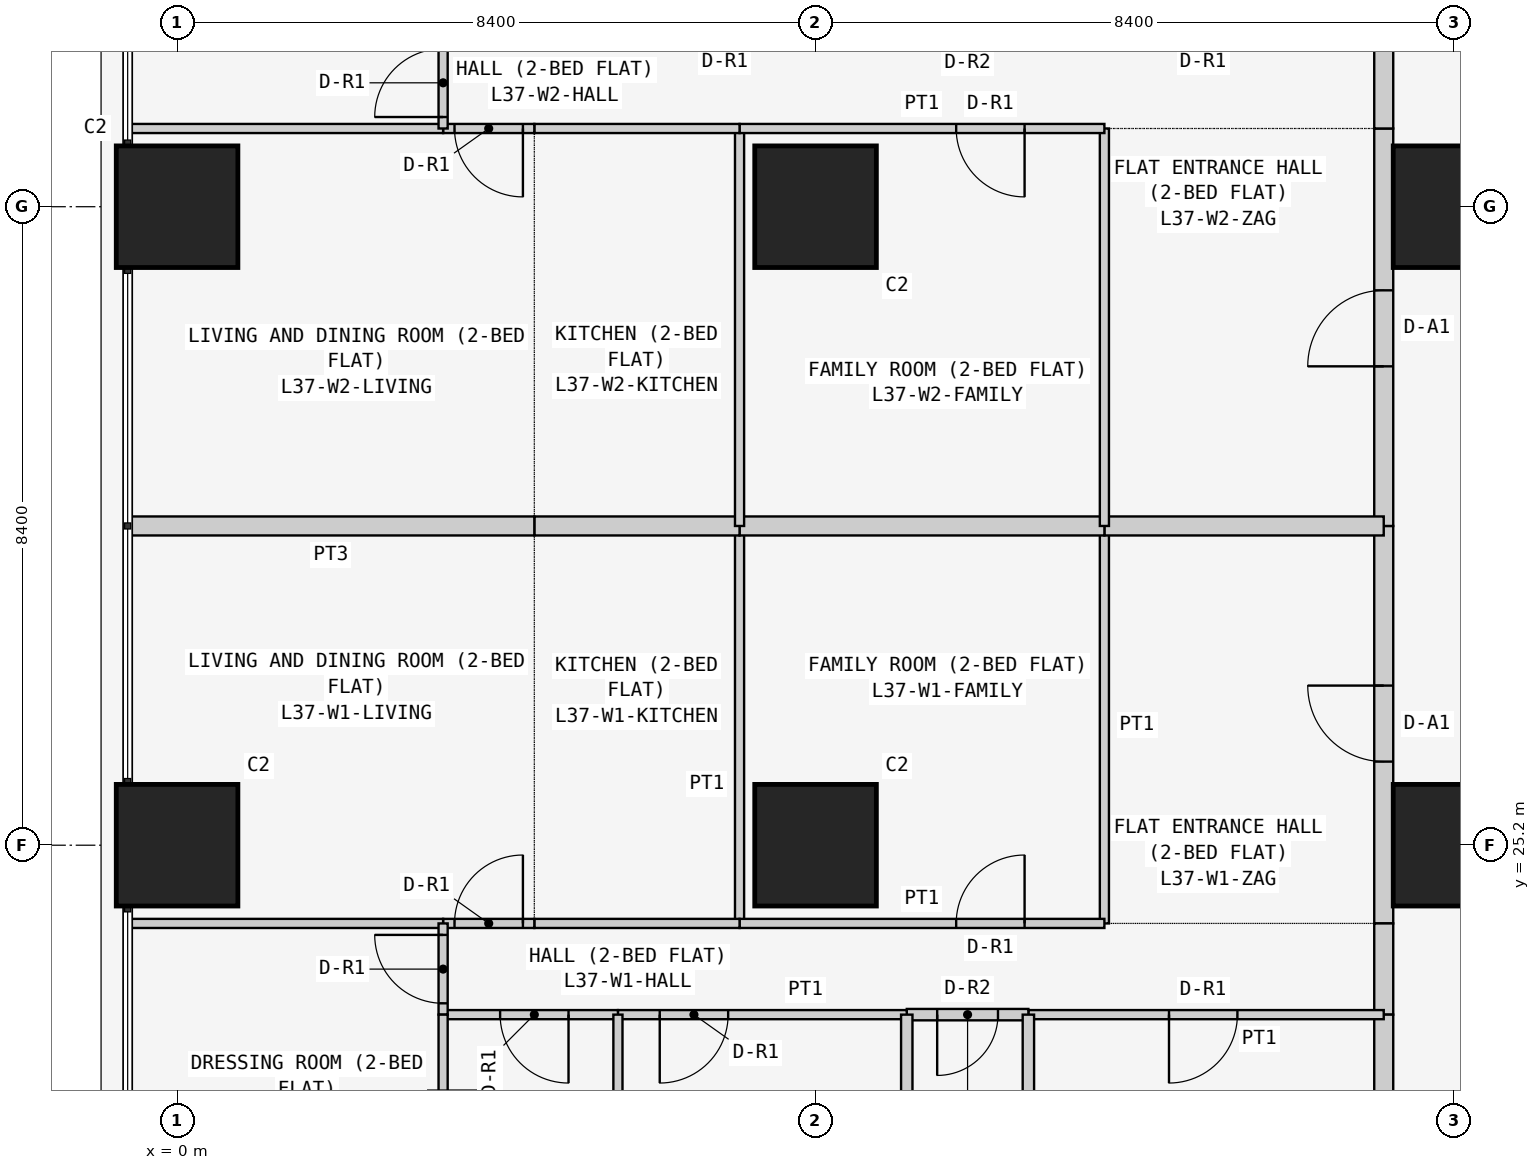
"""IFC4 building model, lengths in metres.
Left out: names, types, materials, properties, quantities, classifications, styles, units other than length and angle.
Written with IfcOpenShell. Run it as: python <this file> out.ifc"""

import sys

from ifc_helpers import new_model, si_unit, direction, frame, frame_2d, origin, origin_2d, place, context, subcontext, project, spatial, rectangle, extrude, element, fill, save


model = new_model("IFC4")
c1 = context("Model", 3, precision=1e-05, world=origin(), true_north=direction((0.0, 1.0)))
c2 = subcontext(c1, "Body", "Model", "MODEL_VIEW")
j1 = project(units=[si_unit("LENGTHUNIT", "METRE"), si_unit("PLANEANGLEUNIT", "RADIAN")], contexts=[c1])
p1 = place(None, origin())
s1 = spatial("IfcSite", under=j1, at=p1, CompositionType="ELEMENT")
p2 = place(p1, origin())
s2 = spatial("IfcBuilding", under=s1, at=p2, CompositionType="ELEMENT")
p3 = place(p2, frame((0.0, 0.0, 144.9)))
s3 = spatial("IfcBuildingStorey", under=s2, at=p3, CompositionType="ELEMENT", Elevation=144.9)
for number, where, z_axis, x_axis in (
    (1, (0.0, 25.2, 0.0), (0.0, 0.0, 1.0), (1.0, 0.0, 0.0)),
    (2, (0.0, 33.6, 0.0), (0.0, 0.0, 1.0), (1.0, 0.0, 0.0)),
    (3, (8.4, 25.2, 0.0), (0.0, 0.0, 1.0), (1.0, 0.0, 0.0)),
    (4, (8.4, 33.6, 0.0), (0.0, 0.0, 1.0), (1.0, 0.0, 0.0)),
    (5, (16.8, 25.2, 0.0), (0.0, 0.0, 1.0), (1.0, 0.0, 0.0)),
    (6, (16.8, 33.6, 0.0), (0.0, 0.0, 1.0), (1.0, 0.0, 0.0)),
):
    element("IfcColumn", number, at=place(p3, frame(where, z_axis=z_axis, x_axis=x_axis)), inside=s3, PredefinedType="COLUMN", context=c2, shape_type="SweptSolid", body=[
        extrude(rectangle(XDim=1.6, YDim=1.6, at=origin_2d()), origin(), (0.0, 0.0, 1.0), 3.6),
    ])
p4 = place(p3, frame((15.875, 24.171, 0.0), z_axis=(0.0, 0.0, 1.0), x_axis=(0.0, 1.0, 0.0)))
e7 = element("IfcWall", 7, at=p4, inside=s3, PredefinedType="PARTITIONING", context=c2, shape_type="SweptSolid", body=[
    extrude(rectangle(XDim=5.229, YDim=0.25, at=frame_2d((2.615, 0.0))), origin(), (0.0, 0.0, 1.0), 3.45),
])
p5 = place(p4, frame((2.129, 0.0, 0.0)))
e8 = element("IfcOpeningElement", 8, at=p5, cuts=e7, PredefinedType="OPENING", context=c2, shape_type="SweptSolid", body=[
    extrude(rectangle(XDim=1.0, YDim=2.1, at=frame_2d((0.5, 1.05))), frame((0.0, 0.135, 0.0), z_axis=(0.0, -1.0, 0.0), x_axis=(1.0, 0.0, 0.0)), (0.0, 0.0, 1.0), 0.27),
])
p6 = place(p3, frame((15.875, 22.971, 0.0), z_axis=(0.0, 0.0, 1.0), x_axis=(0.0, 1.0, 0.0)))
e9 = element("IfcWall", 9, at=p6, inside=s3, PredefinedType="PARTITIONING", context=c2, shape_type="SweptSolid", body=[
    extrude(rectangle(XDim=1.2, YDim=0.25, at=frame_2d((0.6, 0.0))), origin(), (0.0, 0.0, 1.0), 3.45),
])
p7 = place(p3, frame((15.875, 16.1, 0.0), z_axis=(0.0, 0.0, 1.0), x_axis=(0.0, 1.0, 0.0)))
e10 = element("IfcWall", 10, at=p7, inside=s3, PredefinedType="PARTITIONING", context=c2, shape_type="SweptSolid", body=[
    extrude(rectangle(XDim=6.871, YDim=0.25, at=frame_2d((3.436, 0.0))), origin(), (0.0, 0.0, 1.0), 3.45),
])
p8 = place(p3, frame((15.875, 29.4, 0.0), z_axis=(0.0, 0.0, 1.0), x_axis=(0.0, 1.0, 0.0)))
e11 = element("IfcWall", 11, at=p8, inside=s3, PredefinedType="PARTITIONING", context=c2, shape_type="SweptSolid", body=[
    extrude(rectangle(XDim=5.229, YDim=0.25, at=frame_2d((2.615, 0.0))), origin(), (0.0, 0.0, 1.0), 3.45),
])
p9 = place(p8, frame((2.1, 0.0, 0.0)))
e12 = element("IfcOpeningElement", 12, at=p9, cuts=e11, PredefinedType="OPENING", context=c2, shape_type="SweptSolid", body=[
    extrude(rectangle(XDim=1.0, YDim=2.1, at=frame_2d((0.5, 1.05))), frame((0.0, 0.135, 0.0), z_axis=(0.0, -1.0, 0.0), x_axis=(1.0, 0.0, 0.0)), (0.0, 0.0, 1.0), 0.27),
])
p10 = place(p3, frame((15.875, 34.629, 0.0), z_axis=(0.0, 0.0, 1.0), x_axis=(0.0, 1.0, 0.0)))
e13 = element("IfcWall", 13, at=p10, inside=s3, PredefinedType="PARTITIONING", context=c2, shape_type="SweptSolid", body=[
    extrude(rectangle(XDim=1.2, YDim=0.25, at=frame_2d((0.6, 0.0))), origin(), (0.0, 0.0, 1.0), 3.45),
])
p11 = place(p3, frame((12.2, 29.4, 0.0), z_axis=(0.0, 0.0, 1.0), x_axis=(0.0, -1.0, 0.0)))
e14 = element("IfcWall", 14, at=p11, inside=s3, PredefinedType="PARTITIONING", context=c2, shape_type="SweptSolid", body=[
    extrude(rectangle(XDim=5.229, YDim=0.12, at=frame_2d((2.615, 0.0))), origin(), (0.0, 0.0, 1.0), 3.45),
])
p12 = place(p3, frame((15.875, 29.4, 0.0), z_axis=(0.0, 0.0, 1.0), x_axis=(-1.0, 0.0, 0.0)))
e15 = element("IfcWall", 15, at=p12, inside=s3, PredefinedType="PARTITIONING", context=c2, shape_type="SweptSolid", body=[
    extrude(rectangle(XDim=3.675, YDim=0.25, at=frame_2d((1.837, 0.0))), origin(), (0.0, 0.0, 1.0), 3.45),
])
p13 = place(p3, frame((7.4, 29.4, 0.0), z_axis=(0.0, 0.0, 1.0), x_axis=(0.0, -1.0, 0.0)))
e16 = element("IfcWall", 16, at=p13, inside=s3, PredefinedType="PARTITIONING", context=c2, shape_type="SweptSolid", body=[
    extrude(rectangle(XDim=5.229, YDim=0.12, at=frame_2d((2.615, 0.0))), origin(), (0.0, 0.0, 1.0), 3.45),
])
p14 = place(p3, frame((7.4, 24.171, 0.0), z_axis=(0.0, 0.0, 1.0), x_axis=(1.0, 0.0, 0.0)))
e17 = element("IfcWall", 17, at=p14, inside=s3, PredefinedType="PARTITIONING", context=c2, shape_type="SweptSolid", body=[
    extrude(rectangle(XDim=4.8, YDim=0.12, at=frame_2d((2.4, 0.0))), origin(), (0.0, 0.0, 1.0), 3.45),
])
p15 = place(p14, frame((2.85, 0.0, 0.0)))
e18 = element("IfcOpeningElement", 18, at=p15, cuts=e17, PredefinedType="OPENING", context=c2, shape_type="SweptSolid", body=[
    extrude(rectangle(XDim=0.9, YDim=2.1, at=frame_2d((0.45, 1.05))), frame((0.0, 0.07, 0.0), z_axis=(0.0, -1.0, 0.0), x_axis=(1.0, 0.0, 0.0)), (0.0, 0.0, 1.0), 0.14),
])
p16 = place(p3, frame((12.2, 29.4, 0.0), z_axis=(0.0, 0.0, 1.0), x_axis=(-1.0, 0.0, 0.0)))
e19 = element("IfcWall", 19, at=p16, inside=s3, PredefinedType="PARTITIONING", context=c2, shape_type="SweptSolid", body=[
    extrude(rectangle(XDim=4.8, YDim=0.25, at=frame_2d((2.4, 0.0))), origin(), (0.0, 0.0, 1.0), 3.45),
])
p17 = place(p3, frame((4.7, 24.171, 0.0), z_axis=(0.0, 0.0, 1.0), x_axis=(1.0, 0.0, 0.0)))
e20 = element("IfcWall", 20, at=p17, inside=s3, PredefinedType="PARTITIONING", context=c2, shape_type="SweptSolid", body=[
    extrude(rectangle(XDim=2.7, YDim=0.12, at=frame_2d((1.35, 0.0))), origin(), (0.0, 0.0, 1.0), 3.45),
])
p18 = place(p3, frame((7.4, 29.4, 0.0), z_axis=(0.0, 0.0, 1.0), x_axis=(-1.0, 0.0, 0.0)))
e21 = element("IfcWall", 21, at=p18, inside=s3, PredefinedType="PARTITIONING", context=c2, shape_type="SweptSolid", body=[
    extrude(rectangle(XDim=2.7, YDim=0.25, at=frame_2d((1.35, 0.0))), origin(), (0.0, 0.0, 1.0), 3.45),
])
p19 = place(p3, frame((3.5, 24.171, 0.0), z_axis=(0.0, 0.0, 1.0), x_axis=(1.0, 0.0, 0.0)))
e22 = element("IfcWall", 22, at=p19, inside=s3, PredefinedType="PARTITIONING", context=c2, shape_type="SweptSolid", body=[
    extrude(rectangle(XDim=1.2, YDim=0.12, at=frame_2d((0.6, 0.0))), origin(), (0.0, 0.0, 1.0), 3.45),
])
p20 = place(p19, frame((0.15, 0.0, 0.0)))
e23 = element("IfcOpeningElement", 23, at=p20, cuts=e22, PredefinedType="OPENING", context=c2, shape_type="SweptSolid", body=[
    extrude(rectangle(XDim=0.9, YDim=2.1, at=frame_2d((0.45, 1.05))), frame((0.0, 0.07, 0.0), z_axis=(0.0, -1.0, 0.0), x_axis=(1.0, 0.0, 0.0)), (0.0, 0.0, 1.0), 0.14),
])
p21 = place(p3, frame((-0.65, 24.171, 0.0), z_axis=(0.0, 0.0, 1.0), x_axis=(1.0, 0.0, 0.0)))
e24 = element("IfcWall", 24, at=p21, inside=s3, PredefinedType="PARTITIONING", context=c2, shape_type="SweptSolid", body=[
    extrude(rectangle(XDim=4.15, YDim=0.12, at=frame_2d((2.075, 0.0))), origin(), (0.0, 0.0, 1.0), 3.45),
])
p22 = place(p3, frame((4.7, 29.4, 0.0), z_axis=(0.0, 0.0, 1.0), x_axis=(-1.0, 0.0, 0.0)))
e25 = element("IfcWall", 25, at=p22, inside=s3, PredefinedType="PARTITIONING", context=c2, shape_type="SweptSolid", body=[
    extrude(rectangle(XDim=5.35, YDim=0.25, at=frame_2d((2.675, 0.0))), origin(), (0.0, 0.0, 1.0), 3.45),
])
p23 = place(p3, frame((11.2, 22.971, 0.0), z_axis=(0.0, 0.0, 1.0), x_axis=(1.0, 0.0, 0.0)))
e26 = element("IfcWall", 26, at=p23, inside=s3, PredefinedType="PARTITIONING", context=c2, shape_type="SweptSolid", body=[
    extrude(rectangle(XDim=4.675, YDim=0.12, at=frame_2d((2.337, 0.0))), origin(), (0.0, 0.0, 1.0), 3.45),
])
p24 = place(p23, frame((1.85, 0.0, 0.0)))
e27 = element("IfcOpeningElement", 27, at=p24, cuts=e26, PredefinedType="OPENING", context=c2, shape_type="SweptSolid", body=[
    extrude(rectangle(XDim=0.9, YDim=2.1, at=frame_2d((0.45, 1.05))), frame((0.0, 0.07, 0.0), z_axis=(0.0, -1.0, 0.0), x_axis=(1.0, 0.0, 0.0)), (0.0, 0.0, 1.0), 0.14),
])
p25 = place(p3, frame((9.6, 22.971, 0.0), z_axis=(0.0, 0.0, 1.0), x_axis=(1.0, 0.0, 0.0)))
e28 = element("IfcWall", 28, at=p25, inside=s3, PredefinedType="PARTITIONING", context=c2, shape_type="SweptSolid", body=[
    extrude(rectangle(XDim=1.6, YDim=0.15, at=frame_2d((0.8, 0.0))), origin(), (0.0, 0.0, 1.0), 3.45),
])
p26 = place(p25, frame((0.4, 0.0, 0.0)))
e29 = element("IfcOpeningElement", 29, at=p26, cuts=e28, PredefinedType="OPENING", context=c2, shape_type="SweptSolid", body=[
    extrude(rectangle(XDim=0.8, YDim=2.1, at=frame_2d((0.4, 1.05))), frame((0.0, 0.085, 0.0), z_axis=(0.0, -1.0, 0.0), x_axis=(1.0, 0.0, 0.0)), (0.0, 0.0, 1.0), 0.17),
])
p27 = place(p3, frame((5.8, 22.971, 0.0), z_axis=(0.0, 0.0, 1.0), x_axis=(1.0, 0.0, 0.0)))
e30 = element("IfcWall", 30, at=p27, inside=s3, PredefinedType="PARTITIONING", context=c2, shape_type="SweptSolid", body=[
    extrude(rectangle(XDim=3.8, YDim=0.12, at=frame_2d((1.9, 0.0))), origin(), (0.0, 0.0, 1.0), 3.45),
])
p28 = place(p27, frame((0.55, 0.0, 0.0)))
e31 = element("IfcOpeningElement", 31, at=p28, cuts=e30, PredefinedType="OPENING", context=c2, shape_type="SweptSolid", body=[
    extrude(rectangle(XDim=0.9, YDim=2.1, at=frame_2d((0.45, 1.05))), frame((0.0, 0.07, 0.0), z_axis=(0.0, -1.0, 0.0), x_axis=(1.0, 0.0, 0.0)), (0.0, 0.0, 1.0), 0.14),
])
p29 = place(p3, frame((3.5, 22.971, 0.0), z_axis=(0.0, 0.0, 1.0), x_axis=(1.0, 0.0, 0.0)))
e32 = element("IfcWall", 32, at=p29, inside=s3, PredefinedType="PARTITIONING", context=c2, shape_type="SweptSolid", body=[
    extrude(rectangle(XDim=2.3, YDim=0.12, at=frame_2d((1.15, 0.0))), origin(), (0.0, 0.0, 1.0), 3.45),
])
p30 = place(p29, frame((0.75, 0.0, 0.0)))
e33 = element("IfcOpeningElement", 33, at=p30, cuts=e32, PredefinedType="OPENING", context=c2, shape_type="SweptSolid", body=[
    extrude(rectangle(XDim=0.9, YDim=2.1, at=frame_2d((0.45, 1.05))), frame((0.0, 0.07, 0.0), z_axis=(0.0, -1.0, 0.0), x_axis=(1.0, 0.0, 0.0)), (0.0, 0.0, 1.0), 0.14),
])
p31 = place(p3, frame((3.5, 24.171, 0.0), z_axis=(0.0, 0.0, 1.0), x_axis=(0.0, -1.0, 0.0)))
e34 = element("IfcWall", 34, at=p31, inside=s3, PredefinedType="PARTITIONING", context=c2, shape_type="SweptSolid", body=[
    extrude(rectangle(XDim=1.2, YDim=0.12, at=frame_2d((0.6, 0.0))), origin(), (0.0, 0.0, 1.0), 3.45),
])
p32 = place(p31, frame((0.151, 0.0, 0.0)))
e35 = element("IfcOpeningElement", 35, at=p32, cuts=e34, PredefinedType="OPENING", context=c2, shape_type="SweptSolid", body=[
    extrude(rectangle(XDim=0.9, YDim=2.1, at=frame_2d((0.45, 1.05))), frame((0.0, 0.07, 0.0), z_axis=(0.0, -1.0, 0.0), x_axis=(1.0, 0.0, 0.0)), (0.0, 0.0, 1.0), 0.14),
])
for number, where, z_axis, x_axis in (
    (36, (11.2, 22.971, 0.0), (0.0, 0.0, 1.0), (0.0, -1.0, 0.0)),
    (37, (9.6, 22.971, 0.0), (0.0, 0.0, 1.0), (0.0, -1.0, 0.0)),
):
    element("IfcWall", number, at=place(p3, frame(where, z_axis=z_axis, x_axis=x_axis)), inside=s3, PredefinedType="PARTITIONING", context=c2, shape_type="SweptSolid", body=[
        extrude(rectangle(XDim=6.871, YDim=0.15, at=frame_2d((3.436, 0.0))), origin(), (0.0, 0.0, 1.0), 3.45),
    ])
for number, where, z_axis, x_axis in (
    (38, (5.8, 20.971, 0.0), (0.0, 0.0, 1.0), (0.0, 1.0, 0.0)),
    (39, (3.5, 22.971, 0.0), (0.0, 0.0, 1.0), (0.0, -1.0, 0.0)),
):
    element("IfcWall", number, at=place(p3, frame(where, z_axis=z_axis, x_axis=x_axis)), inside=s3, PredefinedType="PARTITIONING", context=c2, shape_type="SweptSolid", body=[
        extrude(rectangle(XDim=2.0, YDim=0.12, at=frame_2d((1.0, 0.0))), origin(), (0.0, 0.0, 1.0), 3.45),
    ])
for number, where, z_axis, x_axis in (
    (40, (12.2, 29.4, 0.0), (0.0, 0.0, 1.0), (0.0, 1.0, 0.0)),
    (41, (7.4, 29.4, 0.0), (0.0, 0.0, 1.0), (0.0, 1.0, 0.0)),
):
    element("IfcWall", number, at=place(p3, frame(where, z_axis=z_axis, x_axis=x_axis)), inside=s3, PredefinedType="PARTITIONING", context=c2, shape_type="SweptSolid", body=[
        extrude(rectangle(XDim=5.229, YDim=0.12, at=frame_2d((2.615, 0.0))), origin(), (0.0, 0.0, 1.0), 3.45),
    ])
p33 = place(p3, frame((7.4, 34.629, 0.0), z_axis=(0.0, 0.0, 1.0), x_axis=(1.0, 0.0, 0.0)))
e42 = element("IfcWall", 42, at=p33, inside=s3, PredefinedType="PARTITIONING", context=c2, shape_type="SweptSolid", body=[
    extrude(rectangle(XDim=4.8, YDim=0.12, at=frame_2d((2.4, 0.0))), origin(), (0.0, 0.0, 1.0), 3.45),
])
p34 = place(p33, frame((2.85, 0.0, 0.0)))
e43 = element("IfcOpeningElement", 43, at=p34, cuts=e42, PredefinedType="OPENING", context=c2, shape_type="SweptSolid", body=[
    extrude(rectangle(XDim=0.9, YDim=2.1, at=frame_2d((0.45, 1.05))), frame((0.0, 0.07, 0.0), z_axis=(0.0, -1.0, 0.0), x_axis=(1.0, 0.0, 0.0)), (0.0, 0.0, 1.0), 0.14),
])
p35 = place(p3, frame((4.7, 34.629, 0.0), z_axis=(0.0, 0.0, 1.0), x_axis=(1.0, 0.0, 0.0)))
e44 = element("IfcWall", 44, at=p35, inside=s3, PredefinedType="PARTITIONING", context=c2, shape_type="SweptSolid", body=[
    extrude(rectangle(XDim=2.7, YDim=0.12, at=frame_2d((1.35, 0.0))), origin(), (0.0, 0.0, 1.0), 3.45),
])
p36 = place(p3, frame((3.5, 34.629, 0.0), z_axis=(0.0, 0.0, 1.0), x_axis=(1.0, 0.0, 0.0)))
e45 = element("IfcWall", 45, at=p36, inside=s3, PredefinedType="PARTITIONING", context=c2, shape_type="SweptSolid", body=[
    extrude(rectangle(XDim=1.2, YDim=0.12, at=frame_2d((0.6, 0.0))), origin(), (0.0, 0.0, 1.0), 3.45),
])
p37 = place(p36, frame((0.15, 0.0, 0.0)))
e46 = element("IfcOpeningElement", 46, at=p37, cuts=e45, PredefinedType="OPENING", context=c2, shape_type="SweptSolid", body=[
    extrude(rectangle(XDim=0.9, YDim=2.1, at=frame_2d((0.45, 1.05))), frame((0.0, 0.07, 0.0), z_axis=(0.0, -1.0, 0.0), x_axis=(1.0, 0.0, 0.0)), (0.0, 0.0, 1.0), 0.14),
])
p38 = place(p3, frame((-0.65, 34.629, 0.0), z_axis=(0.0, 0.0, 1.0), x_axis=(1.0, 0.0, 0.0)))
e47 = element("IfcWall", 47, at=p38, inside=s3, PredefinedType="PARTITIONING", context=c2, shape_type="SweptSolid", body=[
    extrude(rectangle(XDim=4.15, YDim=0.12, at=frame_2d((2.075, 0.0))), origin(), (0.0, 0.0, 1.0), 3.45),
])
p39 = place(p3, frame((3.5, 34.629, 0.0), z_axis=(0.0, 0.0, 1.0), x_axis=(0.0, 1.0, 0.0)))
e48 = element("IfcWall", 48, at=p39, inside=s3, PredefinedType="PARTITIONING", context=c2, shape_type="SweptSolid", body=[
    extrude(rectangle(XDim=1.2, YDim=0.12, at=frame_2d((0.6, 0.0))), origin(), (0.0, 0.0, 1.0), 3.45),
])
p40 = place(p39, frame((0.151, 0.0, 0.0)))
e49 = element("IfcOpeningElement", 49, at=p40, cuts=e48, PredefinedType="OPENING", context=c2, shape_type="SweptSolid", body=[
    extrude(rectangle(XDim=0.9, YDim=2.1, at=frame_2d((0.45, 1.05))), frame((0.0, 0.07, 0.0), z_axis=(0.0, -1.0, 0.0), x_axis=(1.0, 0.0, 0.0)), (0.0, 0.0, 1.0), 0.14),
])
p41 = place(p5, origin())
e50 = element("IfcDoor", 50, at=p41, inside=s3, OperationType="SINGLE_SWING_RIGHT", PredefinedType="DOOR", context=c2, shape_type="SweptSolid", body=[
    extrude(rectangle(XDim=1.0, YDim=2.1, at=frame_2d((0.5, 1.05))), frame((0.0, 0.025, 0.0), z_axis=(0.0, -1.0, 0.0), x_axis=(1.0, 0.0, 0.0)), (0.0, 0.0, 1.0), 0.05),
])
fill(e8, e50)
p42 = place(p15, origin())
e51 = element("IfcDoor", 51, at=p42, inside=s3, OperationType="SINGLE_SWING_RIGHT", PredefinedType="DOOR", context=c2, shape_type="SweptSolid", body=[
    extrude(rectangle(XDim=0.9, YDim=2.1, at=frame_2d((0.45, 1.05))), frame((0.0, 0.025, 0.0), z_axis=(0.0, -1.0, 0.0), x_axis=(1.0, 0.0, 0.0)), (0.0, 0.0, 1.0), 0.05),
])
fill(e18, e51)
p43 = place(p20, origin())
e52 = element("IfcDoor", 52, at=p43, inside=s3, OperationType="SINGLE_SWING_RIGHT", PredefinedType="DOOR", context=c2, shape_type="SweptSolid", body=[
    extrude(rectangle(XDim=0.9, YDim=2.1, at=frame_2d((0.45, 1.05))), frame((0.0, 0.025, 0.0), z_axis=(0.0, -1.0, 0.0), x_axis=(1.0, 0.0, 0.0)), (0.0, 0.0, 1.0), 0.05),
])
fill(e23, e52)
p44 = place(p24, frame((0.9, 0.0, 0.0), z_axis=(0.0, 0.0, 1.0), x_axis=(-1.0, 0.0, 0.0)))
e53 = element("IfcDoor", 53, at=p44, inside=s3, OperationType="SINGLE_SWING_RIGHT", PredefinedType="DOOR", context=c2, shape_type="SweptSolid", body=[
    extrude(rectangle(XDim=0.9, YDim=2.1, at=frame_2d((0.45, 1.05))), frame((0.0, 0.025, 0.0), z_axis=(0.0, -1.0, 0.0), x_axis=(1.0, 0.0, 0.0)), (0.0, 0.0, 1.0), 0.05),
])
fill(e27, e53)
p45 = place(p26, frame((0.8, 0.0, 0.0), z_axis=(0.0, 0.0, 1.0), x_axis=(-1.0, 0.0, 0.0)))
e54 = element("IfcDoor", 54, at=p45, inside=s3, OperationType="SINGLE_SWING_RIGHT", PredefinedType="DOOR", context=c2, shape_type="SweptSolid", body=[
    extrude(rectangle(XDim=0.8, YDim=2.1, at=frame_2d((0.4, 1.05))), frame((0.0, 0.025, 0.0), z_axis=(0.0, -1.0, 0.0), x_axis=(1.0, 0.0, 0.0)), (0.0, 0.0, 1.0), 0.05),
])
fill(e29, e54)
p46 = place(p28, frame((0.9, 0.0, 0.0), z_axis=(0.0, 0.0, 1.0), x_axis=(-1.0, 0.0, 0.0)))
e55 = element("IfcDoor", 55, at=p46, inside=s3, OperationType="SINGLE_SWING_RIGHT", PredefinedType="DOOR", context=c2, shape_type="SweptSolid", body=[
    extrude(rectangle(XDim=0.9, YDim=2.1, at=frame_2d((0.45, 1.05))), frame((0.0, 0.025, 0.0), z_axis=(0.0, -1.0, 0.0), x_axis=(1.0, 0.0, 0.0)), (0.0, 0.0, 1.0), 0.05),
])
fill(e31, e55)
p47 = place(p30, frame((0.9, 0.0, 0.0), z_axis=(0.0, 0.0, 1.0), x_axis=(-1.0, 0.0, 0.0)))
e56 = element("IfcDoor", 56, at=p47, inside=s3, OperationType="SINGLE_SWING_LEFT", PredefinedType="DOOR", context=c2, shape_type="SweptSolid", body=[
    extrude(rectangle(XDim=0.9, YDim=2.1, at=frame_2d((0.45, 1.05))), frame((0.0, 0.025, 0.0), z_axis=(0.0, -1.0, 0.0), x_axis=(1.0, 0.0, 0.0)), (0.0, 0.0, 1.0), 0.05),
])
fill(e33, e56)
p48 = place(p32, frame((0.9, 0.0, 0.0), z_axis=(0.0, 0.0, 1.0), x_axis=(-1.0, 0.0, 0.0)))
e57 = element("IfcDoor", 57, at=p48, inside=s3, OperationType="SINGLE_SWING_RIGHT", PredefinedType="DOOR", context=c2, shape_type="SweptSolid", body=[
    extrude(rectangle(XDim=0.9, YDim=2.1, at=frame_2d((0.45, 1.05))), frame((0.0, 0.025, 0.0), z_axis=(0.0, -1.0, 0.0), x_axis=(1.0, 0.0, 0.0)), (0.0, 0.0, 1.0), 0.05),
])
fill(e35, e57)
p49 = place(p9, origin())
e58 = element("IfcDoor", 58, at=p49, inside=s3, OperationType="SINGLE_SWING_LEFT", PredefinedType="DOOR", context=c2, shape_type="SweptSolid", body=[
    extrude(rectangle(XDim=1.0, YDim=2.1, at=frame_2d((0.5, 1.05))), frame((0.0, 0.025, 0.0), z_axis=(0.0, -1.0, 0.0), x_axis=(1.0, 0.0, 0.0)), (0.0, 0.0, 1.0), 0.05),
])
fill(e12, e58)
p50 = place(p34, frame((0.9, 0.0, 0.0), z_axis=(0.0, 0.0, 1.0), x_axis=(-1.0, 0.0, 0.0)))
e59 = element("IfcDoor", 59, at=p50, inside=s3, OperationType="SINGLE_SWING_LEFT", PredefinedType="DOOR", context=c2, shape_type="SweptSolid", body=[
    extrude(rectangle(XDim=0.9, YDim=2.1, at=frame_2d((0.45, 1.05))), frame((0.0, 0.025, 0.0), z_axis=(0.0, -1.0, 0.0), x_axis=(1.0, 0.0, 0.0)), (0.0, 0.0, 1.0), 0.05),
])
fill(e43, e59)
p51 = place(p37, frame((0.9, 0.0, 0.0), z_axis=(0.0, 0.0, 1.0), x_axis=(-1.0, 0.0, 0.0)))
e60 = element("IfcDoor", 60, at=p51, inside=s3, OperationType="SINGLE_SWING_LEFT", PredefinedType="DOOR", context=c2, shape_type="SweptSolid", body=[
    extrude(rectangle(XDim=0.9, YDim=2.1, at=frame_2d((0.45, 1.05))), frame((0.0, 0.025, 0.0), z_axis=(0.0, -1.0, 0.0), x_axis=(1.0, 0.0, 0.0)), (0.0, 0.0, 1.0), 0.05),
])
fill(e46, e60)
p52 = place(p40, origin())
e61 = element("IfcDoor", 61, at=p52, inside=s3, OperationType="SINGLE_SWING_LEFT", PredefinedType="DOOR", context=c2, shape_type="SweptSolid", body=[
    extrude(rectangle(XDim=0.9, YDim=2.1, at=frame_2d((0.45, 1.05))), frame((0.0, 0.025, 0.0), z_axis=(0.0, -1.0, 0.0), x_axis=(1.0, 0.0, 0.0)), (0.0, 0.0, 1.0), 0.05),
])
fill(e49, e61)
save(model, sys.argv[1])
